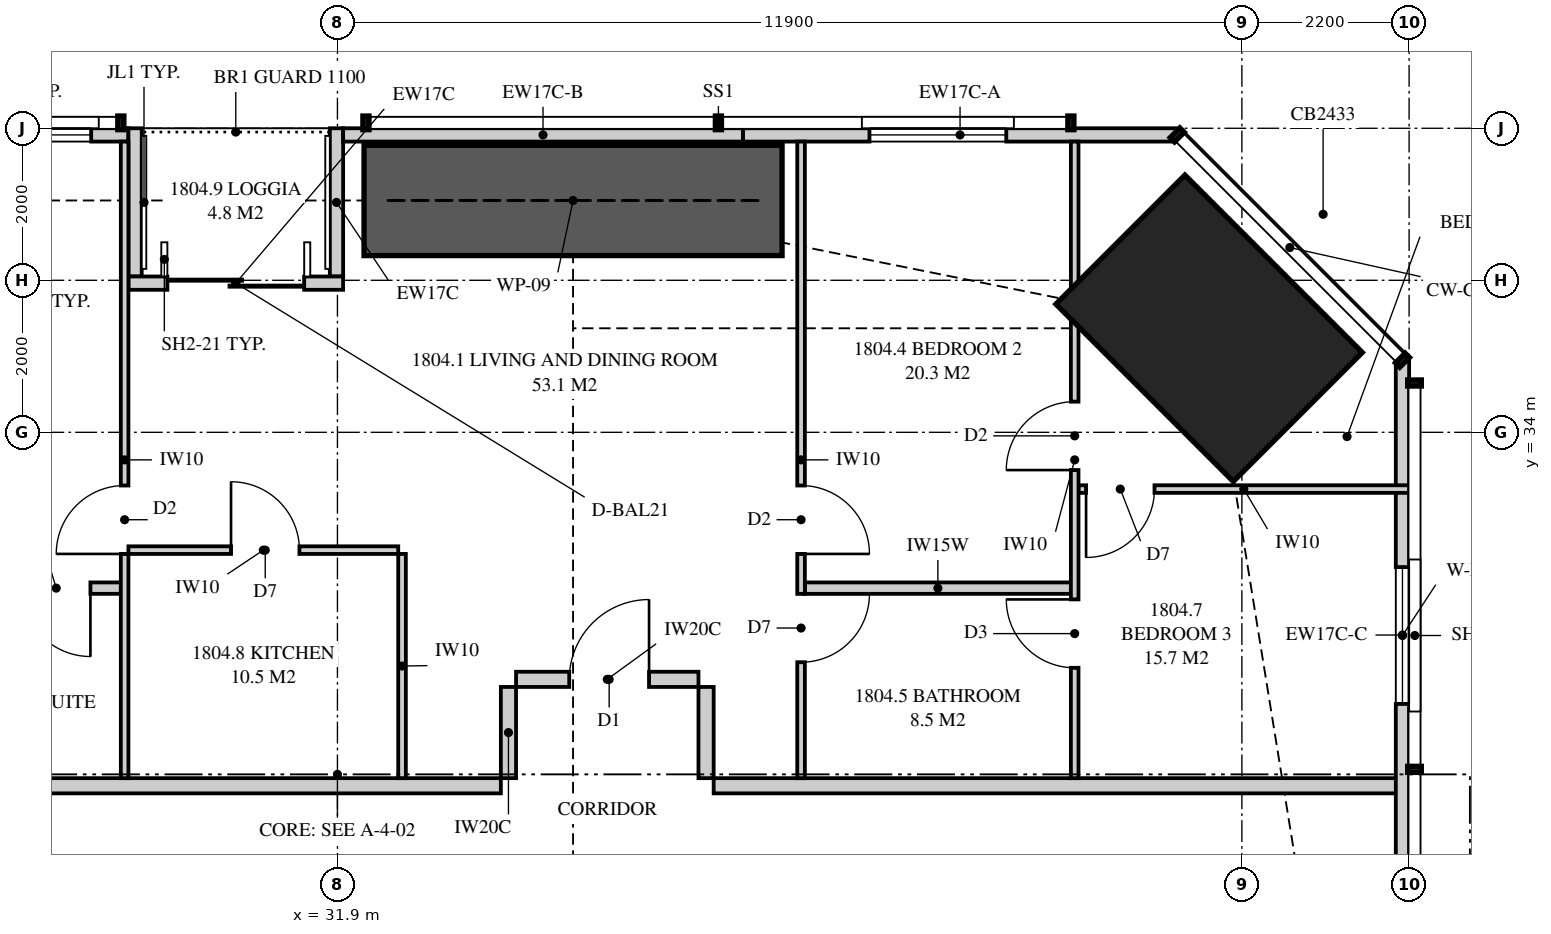
"""IFC4 building model, lengths in metres.
Left out: names, types, materials, properties, quantities, classifications, styles, units other than length and angle.
Written with IfcOpenShell. Run it as: python <this file> out.ifc"""

import sys

from ifc_helpers import new_model, si_unit, direction, frame, frame_2d, origin, origin_2d, place, context, subcontext, project, spatial, polyline, rectangle, hollow_rectangle, outline, extrude, element, fill, save


model = new_model("IFC4")
c1 = context("Model", 3, precision=1e-05, world=origin(), true_north=direction((0.0, 1.0)))
c2 = subcontext(c1, "Body", "Model", "MODEL_VIEW")
j1 = project(units=[si_unit("LENGTHUNIT", "METRE"), si_unit("PLANEANGLEUNIT", "RADIAN")], contexts=[c1])
p1 = place(None, origin())
s1 = spatial("IfcSite", under=j1, at=p1, CompositionType="ELEMENT")
p2 = place(p1, origin())
s2 = spatial("IfcBuilding", under=s1, at=p2, CompositionType="ELEMENT")
p3 = place(p2, frame((0.0, 0.0, 67.9)))
s3 = spatial("IfcBuildingStorey", under=s2, at=p3, CompositionType="ELEMENT", Elevation=67.9)
p4 = place(p3, frame((43.369, 35.369, 0.0), z_axis=(0.0, 0.0, 1.0), x_axis=(-0.707106781187, -0.707106781187, 0.0)))
e1 = element("IfcColumn", 1, at=p4, inside=s3, PredefinedType="COLUMN", context=c2, shape_type="SweptSolid", body=[
    extrude(hollow_rectangle(XDim=2.4, YDim=3.3, WallThickness=0.125, at=origin_2d()), origin(), (0.0, 0.0, 1.0), 3.35),
])
p5 = place(p3, frame((45.913, 27.718, 0.0), z_axis=(0.0, 0.0, 1.0), x_axis=(0.0, 1.0, 0.0)))
e2 = element("IfcWall", 2, at=p5, inside=s3, PredefinedType="SOLIDWALL", context=c2, shape_type="SweptSolid", body=[
    extrude(rectangle(XDim=7.231, YDim=0.175, at=frame_2d((3.616, 0.0))), origin(), (0.0, 0.0, 1.0), 3.11),
])
p6 = place(p5, frame((2.709, 0.0, 0.4)))
e3 = element("IfcOpeningElement", 3, at=p6, cuts=e2, PredefinedType="OPENING", context=c2, shape_type="SweptSolid", body=[
    extrude(rectangle(XDim=1.8, YDim=1.7, at=frame_2d((0.9, 0.85))), frame((0.0, 0.097, 0.0), z_axis=(0.0, -1.0, 0.0), x_axis=(1.0, 0.0, 0.0)), (0.0, 0.0, 1.0), 0.195),
])
p7 = place(p3, frame((42.949, 37.913, 0.0), z_axis=(0.0, 0.0, 1.0), x_axis=(-1.0, 0.0, 0.0)))
e4 = element("IfcWall", 4, at=p7, inside=s3, PredefinedType="SOLIDWALL", context=c2, shape_type="SweptSolid", body=[
    extrude(rectangle(XDim=5.714, YDim=0.175, at=frame_2d((2.857, 0.0))), origin(), (0.0, 0.0, 1.0), 3.11),
])
p8 = place(p7, frame((2.249, 0.0, 0.4)))
e5 = element("IfcOpeningElement", 5, at=p8, cuts=e4, PredefinedType="OPENING", context=c2, shape_type="SweptSolid", body=[
    extrude(rectangle(XDim=1.8, YDim=1.7, at=frame_2d((0.9, 0.85))), frame((0.0, 0.097, 0.0), z_axis=(0.0, -1.0, 0.0), x_axis=(1.0, 0.0, 0.0)), (0.0, 0.0, 1.0), 0.195),
])
p9 = place(p3, frame((37.235, 37.913, 0.0), z_axis=(0.0, 0.0, 1.0), x_axis=(-1.0, 0.0, 0.0)))
e6 = element("IfcWall", 6, at=p9, inside=s3, PredefinedType="SOLIDWALL", context=c2, shape_type="SweptSolid", body=[
    extrude(rectangle(XDim=5.26, YDim=0.175, at=frame_2d((2.63, 0.0))), origin(), (0.0, 0.0, 1.0), 2.15),
])
p10 = place(p3, frame((29.15, 37.913, 0.0), z_axis=(0.0, 0.0, 1.0), x_axis=(-1.0, 0.0, 0.0)))
e7 = element("IfcWall", 7, at=p10, inside=s3, PredefinedType="SOLIDWALL", context=c2, shape_type="SweptSolid", body=[
    extrude(rectangle(XDim=7.95, YDim=0.175, at=frame_2d((3.975, 0.0))), origin(), (0.0, 0.0, 1.0), 2.15),
])
p11 = place(p10, frame((0.49, 0.0, 0.4)))
e8 = element("IfcOpeningElement", 8, at=p11, cuts=e7, PredefinedType="OPENING", context=c2, shape_type="SweptSolid", body=[
    extrude(rectangle(XDim=1.8, YDim=1.7, at=frame_2d((0.9, 0.85))), frame((0.0, 0.097, 0.0), z_axis=(0.0, -1.0, 0.0), x_axis=(1.0, 0.0, 0.0)), (0.0, 0.0, 1.0), 0.195),
])
p12 = place(p3, frame((31.975, 35.962, 0.0), z_axis=(0.0, 0.0, 1.0), x_axis=(-1.0, 0.0, 0.0)))
e9 = element("IfcWall", 9, at=p12, inside=s3, PredefinedType="SOLIDWALL", context=c2, shape_type="SweptSolid", body=[
    extrude(rectangle(XDim=2.825, YDim=0.175, at=frame_2d((1.413, 0.0))), origin(), (0.0, 0.0, 1.0), 2.15),
])
p13 = place(p12, frame((0.512, 0.0, 0.0)))
e10 = element("IfcOpeningElement", 10, at=p13, cuts=e9, PredefinedType="OPENING", context=c2, shape_type="SweptSolid", body=[
    extrude(rectangle(XDim=1.8, YDim=2.1, at=frame_2d((0.9, 1.05))), frame((0.0, 0.097, 0.0), z_axis=(0.0, -1.0, 0.0), x_axis=(1.0, 0.0, 0.0)), (0.0, 0.0, 1.0), 0.195),
])
for number, where, z_axis, x_axis in (
    (11, (31.887, 38.0, 0.0), (0.0, 0.0, 1.0), (0.0, -1.0, 0.0)),
    (12, (29.238, 38.0, 0.0), (0.0, 0.0, 1.0), (0.0, -1.0, 0.0)),
):
    element("IfcWall", number, at=place(p3, frame(where, z_axis=z_axis, x_axis=x_axis)), inside=s3, PredefinedType="SOLIDWALL", context=c2, shape_type="SweptSolid", body=[
        extrude(rectangle(XDim=1.95, YDim=0.175, at=frame_2d((0.975, 0.0))), origin(), (0.0, 0.0, 1.0), 2.15),
    ])
p14 = place(p3, frame((25.0, 29.35, 0.0), z_axis=(0.0, 0.0, 1.0), x_axis=(1.0, 0.0, 0.0)))
e13 = element("IfcWall", 13, at=p14, inside=s3, PredefinedType="PARTITIONING", context=c2, shape_type="SweptSolid", body=[
    extrude(rectangle(XDim=9.05, YDim=0.2, at=frame_2d((4.525, 0.0))), origin(), (0.0, 0.0, 1.0), 3.11),
])
p15 = place(p3, frame((29.1, 37.825, 0.0), z_axis=(0.0, 0.0, 1.0), x_axis=(0.0, -1.0, 0.0)))
e14 = element("IfcWall", 14, at=p15, inside=s3, PredefinedType="PARTITIONING", context=c2, shape_type="SweptSolid", body=[
    extrude(outline(polyline([(0.0, 0.0), (8.375, 0.0), (8.375, 3.11), (2.035, 3.11), (2.035, 2.15), (0.0, 2.15), (0.0, 3.11), (0.0, 0.0)])), frame((0.0, 0.05, 0.0), z_axis=(0.0, -1.0, 0.0), x_axis=(1.0, 0.0, 0.0)), (0.0, 0.0, 1.0), 0.1),
])
p16 = place(p15, frame((4.525, 0.0, 0.0)))
e15 = element("IfcOpeningElement", 15, at=p16, cuts=e14, PredefinedType="OPENING", context=c2, shape_type="SweptSolid", body=[
    extrude(rectangle(XDim=0.9, YDim=2.1, at=frame_2d((0.45, 1.05))), frame((0.0, 0.06, 0.0), z_axis=(0.0, -1.0, 0.0), x_axis=(1.0, 0.0, 0.0)), (0.0, 0.0, 1.0), 0.12),
])
p17 = place(p3, frame((38.0, 37.825, 0.0), z_axis=(0.0, 0.0, 1.0), x_axis=(0.0, -1.0, 0.0)))
e16 = element("IfcWall", 16, at=p17, inside=s3, PredefinedType="PARTITIONING", context=c2, shape_type="SweptSolid", body=[
    extrude(outline(polyline([(0.0, 0.0), (8.375, 0.0), (8.375, 3.11), (3.716, 3.11), (3.716, 2.51), (2.663, 2.51), (2.663, 2.15), (0.093, 2.15), (0.093, 3.11), (0.0, 3.11), (0.0, 0.0)])), frame((0.0, 0.05, 0.0), z_axis=(0.0, -1.0, 0.0), x_axis=(1.0, 0.0, 0.0)), (0.0, 0.0, 1.0), 0.1),
])
p18 = place(p17, frame((4.525, 0.0, 0.0)))
e17 = element("IfcOpeningElement", 17, at=p18, cuts=e16, PredefinedType="OPENING", context=c2, shape_type="SweptSolid", body=[
    extrude(rectangle(XDim=0.9, YDim=2.1, at=frame_2d((0.45, 1.05))), frame((0.0, 0.06, 0.0), z_axis=(0.0, -1.0, 0.0), x_axis=(1.0, 0.0, 0.0)), (0.0, 0.0, 1.0), 0.12),
])
p19 = place(p17, frame((5.95, 0.0, 0.0)))
e18 = element("IfcOpeningElement", 18, at=p19, cuts=e16, PredefinedType="OPENING", context=c2, shape_type="SweptSolid", body=[
    extrude(rectangle(XDim=0.9, YDim=2.1, at=frame_2d((0.45, 1.05))), frame((0.0, 0.06, 0.0), z_axis=(0.0, -1.0, 0.0), x_axis=(1.0, 0.0, 0.0)), (0.0, 0.0, 1.0), 0.12),
])
p20 = place(p3, frame((41.6, 37.825, 0.0), z_axis=(0.0, 0.0, 1.0), x_axis=(0.0, -1.0, 0.0)))
e19 = element("IfcWall", 19, at=p20, inside=s3, PredefinedType="PARTITIONING", context=c2, shape_type="SweptSolid", body=[
    extrude(outline(polyline([(0.0, 0.0), (8.375, 0.0), (8.375, 3.11), (3.716, 3.11), (3.716, 2.51), (3.386, 2.51), (3.386, 2.15), (0.816, 2.15), (0.816, 3.11), (0.0, 3.11), (0.0, 0.0)])), frame((0.0, 0.05, 0.0), z_axis=(0.0, -1.0, 0.0), x_axis=(1.0, 0.0, 0.0)), (0.0, 0.0, 1.0), 0.1),
])
p21 = place(p20, frame((3.422, 0.0, 0.0)))
e20 = element("IfcOpeningElement", 20, at=p21, cuts=e19, PredefinedType="OPENING", context=c2, shape_type="SweptSolid", body=[
    extrude(rectangle(XDim=0.9, YDim=2.1, at=frame_2d((0.45, 1.05))), frame((0.0, 0.06, 0.0), z_axis=(0.0, -1.0, 0.0), x_axis=(1.0, 0.0, 0.0)), (0.0, 0.0, 1.0), 0.12),
])
p22 = place(p20, frame((6.023, 0.0, 0.0)))
e21 = element("IfcOpeningElement", 21, at=p22, cuts=e19, PredefinedType="OPENING", context=c2, shape_type="SweptSolid", body=[
    extrude(rectangle(XDim=0.9, YDim=2.1, at=frame_2d((0.45, 1.05))), frame((0.0, 0.06, 0.0), z_axis=(0.0, -1.0, 0.0), x_axis=(1.0, 0.0, 0.0)), (0.0, 0.0, 1.0), 0.12),
])
p23 = place(p3, frame((25.0, 31.95, 0.0), z_axis=(0.0, 0.0, 1.0), x_axis=(1.0, 0.0, 0.0)))
e22 = element("IfcWall", 22, at=p23, inside=s3, PredefinedType="PLUMBINGWALL", context=c2, shape_type="SweptSolid", body=[
    extrude(rectangle(XDim=4.05, YDim=0.15, at=frame_2d((2.025, 0.0))), origin(), (0.0, 0.0, 1.0), 3.11),
])
p24 = place(p23, frame((2.75, 0.0, 0.0)))
e23 = element("IfcOpeningElement", 23, at=p24, cuts=e22, PredefinedType="OPENING", context=c2, shape_type="SweptSolid", body=[
    extrude(rectangle(XDim=0.9, YDim=2.1, at=frame_2d((0.45, 1.05))), frame((0.0, 0.085, 0.0), z_axis=(0.0, -1.0, 0.0), x_axis=(1.0, 0.0, 0.0)), (0.0, 0.0, 1.0), 0.17),
])
p25 = place(p3, frame((38.05, 31.95, 0.0), z_axis=(0.0, 0.0, 1.0), x_axis=(1.0, 0.0, 0.0)))
e24 = element("IfcWall", 24, at=p25, inside=s3, PredefinedType="PLUMBINGWALL", context=c2, shape_type="SweptSolid", body=[
    extrude(rectangle(XDim=3.5, YDim=0.15, at=frame_2d((1.75, 0.0))), origin(), (0.0, 0.0, 1.0), 3.11),
])
p26 = place(p3, frame((41.65, 33.253, 0.0), z_axis=(0.0, 0.0, 1.0), x_axis=(1.0, 0.0, 0.0)))
e25 = element("IfcWall", 25, at=p26, inside=s3, PredefinedType="PARTITIONING", context=c2, shape_type="SweptSolid", body=[
    extrude(outline(polyline([(0.0, 0.0), (4.35, 0.0), (4.35, 3.11), (3.338, 3.11), (3.338, 2.15), (0.785, 2.15), (0.785, 3.11), (0.0, 3.11), (0.0, 0.0)])), frame((0.0, 0.05, 0.0), z_axis=(0.0, -1.0, 0.0), x_axis=(1.0, 0.0, 0.0)), (0.0, 0.0, 1.0), 0.1),
])
p27 = place(p26, frame((0.1, 0.0, 0.0)))
e26 = element("IfcOpeningElement", 26, at=p27, cuts=e25, PredefinedType="OPENING", context=c2, shape_type="SweptSolid", body=[
    extrude(rectangle(XDim=0.9, YDim=2.1, at=frame_2d((0.45, 1.05))), frame((0.0, 0.06, 0.0), z_axis=(0.0, -1.0, 0.0), x_axis=(1.0, 0.0, 0.0)), (0.0, 0.0, 1.0), 0.12),
])
p28 = place(p3, frame((29.15, 32.45, 0.0), z_axis=(0.0, 0.0, 1.0), x_axis=(1.0, 0.0, 0.0)))
e27 = element("IfcWall", 27, at=p28, inside=s3, PredefinedType="PARTITIONING", context=c2, shape_type="SweptSolid", body=[
    extrude(rectangle(XDim=3.55, YDim=0.1, at=frame_2d((1.775, 0.0))), origin(), (0.0, 0.0, 1.0), 3.11),
])
p29 = place(p28, frame((1.35, 0.0, 0.0)))
e28 = element("IfcOpeningElement", 28, at=p29, cuts=e27, PredefinedType="OPENING", context=c2, shape_type="SweptSolid", body=[
    extrude(rectangle(XDim=0.9, YDim=2.1, at=frame_2d((0.45, 1.05))), frame((0.0, 0.06, 0.0), z_axis=(0.0, -1.0, 0.0), x_axis=(1.0, 0.0, 0.0)), (0.0, 0.0, 1.0), 0.12),
])
p30 = place(p3, frame((32.75, 32.4, 0.0), z_axis=(0.0, 0.0, 1.0), x_axis=(0.0, -1.0, 0.0)))
e29 = element("IfcWall", 29, at=p30, inside=s3, PredefinedType="PARTITIONING", context=c2, shape_type="SweptSolid", body=[
    extrude(rectangle(XDim=2.95, YDim=0.1, at=frame_2d((1.475, 0.0))), origin(), (0.0, 0.0, 1.0), 3.11),
])
p31 = place(p3, frame((36.85, 29.35, 0.0), z_axis=(0.0, 0.0, 1.0), x_axis=(1.0, 0.0, 0.0)))
e30 = element("IfcWall", 30, at=p31, inside=s3, PredefinedType="PARTITIONING", context=c2, shape_type="SweptSolid", body=[
    extrude(outline(polyline([(0.0, 0.0), (9.15, 0.0), (9.15, 3.11), (8.822, 3.11), (8.822, 2.15), (6.167, 2.15), (6.167, 3.11), (0.0, 3.11), (0.0, 0.0)])), frame((0.0, 0.1, 0.0), z_axis=(0.0, -1.0, 0.0), x_axis=(1.0, 0.0, 0.0)), (0.0, 0.0, 1.0), 0.2),
])
p32 = place(p3, frame((34.25, 30.75, 0.0), z_axis=(0.0, 0.0, 1.0), x_axis=(1.0, 0.0, 0.0)))
e31 = element("IfcWall", 31, at=p32, inside=s3, PredefinedType="PARTITIONING", context=c2, shape_type="SweptSolid", body=[
    extrude(outline(polyline([(0.0, 0.0), (2.4, 0.0), (2.4, 3.11), (1.087, 3.11), (1.087, 2.541), (0.413, 2.541), (0.413, 3.11), (0.0, 3.11), (0.0, 0.0)])), frame((0.0, 0.1, 0.0), z_axis=(0.0, -1.0, 0.0), x_axis=(1.0, 0.0, 0.0)), (0.0, 0.0, 1.0), 0.2),
])
p33 = place(p32, frame((0.7, 0.0, 0.0)))
e32 = element("IfcOpeningElement", 32, at=p33, cuts=e31, PredefinedType="OPENING", context=c2, shape_type="SweptSolid", body=[
    extrude(rectangle(XDim=1.05, YDim=2.2, at=frame_2d((0.525, 1.1))), frame((0.0, 0.11, 0.0), z_axis=(0.0, -1.0, 0.0), x_axis=(1.0, 0.0, 0.0)), (0.0, 0.0, 1.0), 0.22),
])
for number, where, z_axis, x_axis in (
    (33, (34.15, 29.45, 0.0), (0.0, 0.0, 1.0), (0.0, 1.0, 0.0)),
    (34, (36.75, 29.45, 0.0), (0.0, 0.0, 1.0), (0.0, 1.0, 0.0)),
):
    element("IfcWall", number, at=place(p3, frame(where, z_axis=z_axis, x_axis=x_axis)), inside=s3, PredefinedType="PARTITIONING", context=c2, shape_type="SweptSolid", body=[
        extrude(rectangle(XDim=1.2, YDim=0.2, at=frame_2d((0.6, 0.0))), origin(), (0.0, 0.0, 1.0), 3.11),
    ])
p34 = place(p3, frame((32.25, 37.05, 0.0), z_axis=(0.0, 0.0, 1.0), x_axis=(1.0, 0.0, 0.0)))
e35 = element("IfcWall", 35, at=p34, inside=s3, PredefinedType="SHEAR", context=c2, shape_type="SweptSolid", body=[
    extrude(rectangle(XDim=5.5, YDim=1.45, at=frame_2d((2.75, 0.0))), origin(), (0.0, 0.0, 1.0), 3.35),
])
p35 = place(p6, origin())
e36 = element("IfcWindow", 36, at=p35, inside=s3, PartitioningType="SINGLE_PANEL", PredefinedType="WINDOW", context=c2, shape_type="SweptSolid", body=[
    extrude(rectangle(XDim=1.8, YDim=1.7, at=frame_2d((0.9, 0.85))), frame((0.0, 0.03, 0.0), z_axis=(0.0, -1.0, 0.0), x_axis=(1.0, 0.0, 0.0)), (0.0, 0.0, 1.0), 0.06),
])
fill(e3, e36)
p36 = place(p8, origin())
e37 = element("IfcWindow", 37, at=p36, inside=s3, PartitioningType="SINGLE_PANEL", PredefinedType="WINDOW", context=c2, shape_type="SweptSolid", body=[
    extrude(rectangle(XDim=1.8, YDim=1.7, at=frame_2d((0.9, 0.85))), frame((0.0, 0.03, 0.0), z_axis=(0.0, -1.0, 0.0), x_axis=(1.0, 0.0, 0.0)), (0.0, 0.0, 1.0), 0.06),
])
fill(e5, e37)
p37 = place(p13, origin())
e38 = element("IfcDoor", 38, at=p37, inside=s3, OperationType="SLIDING_TO_LEFT", PredefinedType="DOOR", context=c2, shape_type="SweptSolid", body=[
    extrude(rectangle(XDim=1.8, YDim=2.1, at=frame_2d((0.9, 1.05))), frame((0.0, 0.025, 0.0), z_axis=(0.0, -1.0, 0.0), x_axis=(1.0, 0.0, 0.0)), (0.0, 0.0, 1.0), 0.05),
])
fill(e10, e38)
p38 = place(p11, origin())
e39 = element("IfcWindow", 39, at=p38, inside=s3, PartitioningType="SINGLE_PANEL", PredefinedType="WINDOW", context=c2, shape_type="SweptSolid", body=[
    extrude(rectangle(XDim=1.8, YDim=1.7, at=frame_2d((0.9, 0.85))), frame((0.0, 0.03, 0.0), z_axis=(0.0, -1.0, 0.0), x_axis=(1.0, 0.0, 0.0)), (0.0, 0.0, 1.0), 0.06),
])
fill(e8, e39)
p39 = place(p33, origin())
e40 = element("IfcDoor", 40, at=p39, inside=s3, OperationType="SINGLE_SWING_RIGHT", PredefinedType="DOOR", context=c2, shape_type="SweptSolid", body=[
    extrude(rectangle(XDim=1.05, YDim=2.2, at=frame_2d((0.525, 1.1))), frame((0.0, 0.025, 0.0), z_axis=(0.0, -1.0, 0.0), x_axis=(1.0, 0.0, 0.0)), (0.0, 0.0, 1.0), 0.05),
])
fill(e32, e40)
p40 = place(p16, frame((0.9, 0.0, 0.0), z_axis=(0.0, 0.0, 1.0), x_axis=(-1.0, 0.0, 0.0)))
e41 = element("IfcDoor", 41, at=p40, inside=s3, OperationType="SINGLE_SWING_LEFT", PredefinedType="DOOR", context=c2, shape_type="SweptSolid", body=[
    extrude(rectangle(XDim=0.9, YDim=2.1, at=frame_2d((0.45, 1.05))), frame((0.0, 0.025, 0.0), z_axis=(0.0, -1.0, 0.0), x_axis=(1.0, 0.0, 0.0)), (0.0, 0.0, 1.0), 0.05),
])
fill(e15, e41)
p41 = place(p24, frame((0.9, 0.0, 0.0), z_axis=(0.0, 0.0, 1.0), x_axis=(-1.0, 0.0, 0.0)))
e42 = element("IfcDoor", 42, at=p41, inside=s3, OperationType="SINGLE_SWING_LEFT", PredefinedType="DOOR", context=c2, shape_type="SweptSolid", body=[
    extrude(rectangle(XDim=0.9, YDim=2.1, at=frame_2d((0.45, 1.05))), frame((0.0, 0.025, 0.0), z_axis=(0.0, -1.0, 0.0), x_axis=(1.0, 0.0, 0.0)), (0.0, 0.0, 1.0), 0.05),
])
fill(e23, e42)
p42 = place(p18, origin())
e43 = element("IfcDoor", 43, at=p42, inside=s3, OperationType="SINGLE_SWING_RIGHT", PredefinedType="DOOR", context=c2, shape_type="SweptSolid", body=[
    extrude(rectangle(XDim=0.9, YDim=2.1, at=frame_2d((0.45, 1.05))), frame((0.0, 0.025, 0.0), z_axis=(0.0, -1.0, 0.0), x_axis=(1.0, 0.0, 0.0)), (0.0, 0.0, 1.0), 0.05),
])
fill(e17, e43)
p43 = place(p19, origin())
e44 = element("IfcDoor", 44, at=p43, inside=s3, OperationType="SINGLE_SWING_LEFT", PredefinedType="DOOR", context=c2, shape_type="SweptSolid", body=[
    extrude(rectangle(XDim=0.9, YDim=2.1, at=frame_2d((0.45, 1.05))), frame((0.0, 0.025, 0.0), z_axis=(0.0, -1.0, 0.0), x_axis=(1.0, 0.0, 0.0)), (0.0, 0.0, 1.0), 0.05),
])
fill(e18, e44)
p44 = place(p27, frame((0.9, 0.0, 0.0), z_axis=(0.0, 0.0, 1.0), x_axis=(-1.0, 0.0, 0.0)))
e45 = element("IfcDoor", 45, at=p44, inside=s3, OperationType="SINGLE_SWING_RIGHT", PredefinedType="DOOR", context=c2, shape_type="SweptSolid", body=[
    extrude(rectangle(XDim=0.9, YDim=2.1, at=frame_2d((0.45, 1.05))), frame((0.0, 0.025, 0.0), z_axis=(0.0, -1.0, 0.0), x_axis=(1.0, 0.0, 0.0)), (0.0, 0.0, 1.0), 0.05),
])
fill(e26, e45)
p45 = place(p21, frame((0.9, 0.0, 0.0), z_axis=(0.0, 0.0, 1.0), x_axis=(-1.0, 0.0, 0.0)))
e46 = element("IfcDoor", 46, at=p45, inside=s3, OperationType="SINGLE_SWING_LEFT", PredefinedType="DOOR", context=c2, shape_type="SweptSolid", body=[
    extrude(rectangle(XDim=0.9, YDim=2.1, at=frame_2d((0.45, 1.05))), frame((0.0, 0.025, 0.0), z_axis=(0.0, -1.0, 0.0), x_axis=(1.0, 0.0, 0.0)), (0.0, 0.0, 1.0), 0.05),
])
fill(e20, e46)
p46 = place(p22, frame((0.9, 0.0, 0.0), z_axis=(0.0, 0.0, 1.0), x_axis=(-1.0, 0.0, 0.0)))
e47 = element("IfcDoor", 47, at=p46, inside=s3, OperationType="SINGLE_SWING_RIGHT", PredefinedType="DOOR", context=c2, shape_type="SweptSolid", body=[
    extrude(rectangle(XDim=0.9, YDim=2.1, at=frame_2d((0.45, 1.05))), frame((0.0, 0.025, 0.0), z_axis=(0.0, -1.0, 0.0), x_axis=(1.0, 0.0, 0.0)), (0.0, 0.0, 1.0), 0.05),
])
fill(e21, e47)
p47 = place(p29, origin())
e48 = element("IfcDoor", 48, at=p47, inside=s3, OperationType="SINGLE_SWING_LEFT", PredefinedType="DOOR", context=c2, shape_type="SweptSolid", body=[
    extrude(rectangle(XDim=0.9, YDim=2.1, at=frame_2d((0.45, 1.05))), frame((0.0, 0.025, 0.0), z_axis=(0.0, -1.0, 0.0), x_axis=(1.0, 0.0, 0.0)), (0.0, 0.0, 1.0), 0.05),
])
fill(e28, e48)
save(model, sys.argv[1])
